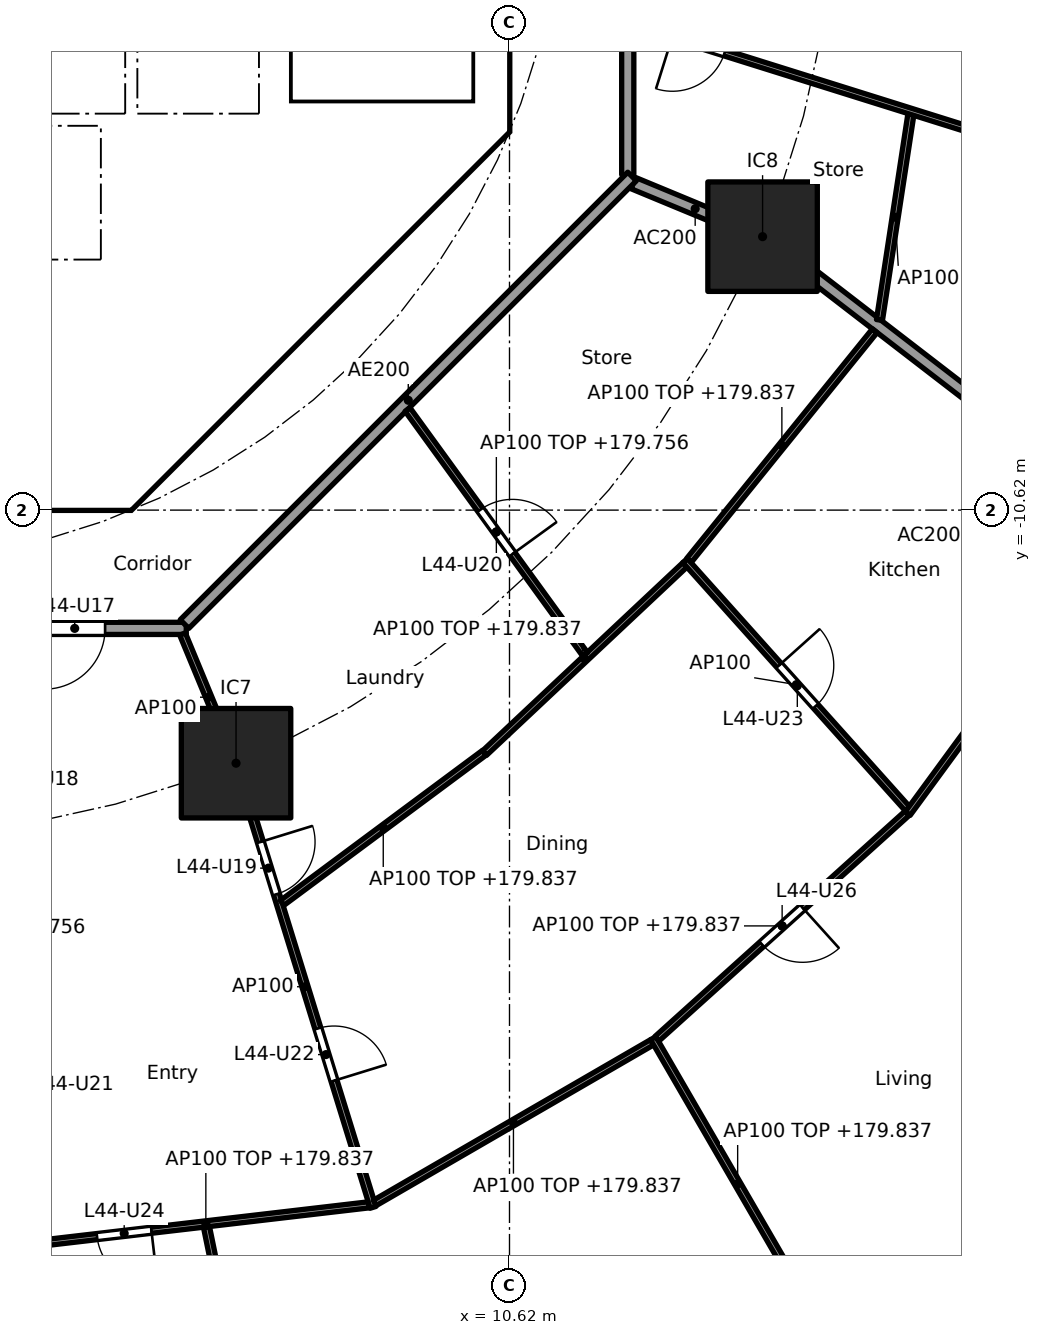
"""IFC4 building model, lengths in metres.
Left out: names, types, materials, properties, quantities, classifications, styles, units other than length and angle.
Written with IfcOpenShell. Run it as: python <this file> out.ifc"""

import sys

from ifc_helpers import new_model, si_unit, direction, frame, frame_2d, origin, origin_2d, place, context, subcontext, project, spatial, polyline, rectangle, outline, extrude, element, fill, save


model = new_model("IFC4")
c1 = context("Model", 3, precision=1e-05, world=origin(), true_north=direction((0.0, 1.0)))
c2 = subcontext(c1, "Body", "Model", "MODEL_VIEW")
j1 = project(units=[si_unit("LENGTHUNIT", "METRE"), si_unit("PLANEANGLEUNIT", "RADIAN")], contexts=[c1])
p1 = place(None, origin())
s1 = spatial("IfcSite", under=j1, at=p1, CompositionType="ELEMENT")
p2 = place(p1, origin())
s2 = spatial("IfcBuilding", under=s1, at=p2, CompositionType="ELEMENT")
p3 = place(p2, frame((0.0, 0.0, 177.0)))
s3 = spatial("IfcBuildingStorey", under=s2, at=p3, CompositionType="ELEMENT", Elevation=177.0)
for number, where, z_axis, x_axis in (
    (1, (6.123, -14.782, 0.0), (0.0, 0.0, 1.0), (1.0, 0.0, 0.0)),
    (2, (14.782, -6.123, 0.0), (0.0, 0.0, 1.0), (1.0, 0.0, 0.0)),
):
    element("IfcColumn", number, at=place(p3, frame(where, z_axis=z_axis, x_axis=x_axis)), inside=s3, PredefinedType="COLUMN", context=c2, shape_type="SweptSolid", body=[
        extrude(rectangle(XDim=1.8, YDim=1.8, at=origin_2d()), origin(), (0.0, 0.0, 1.0), 3.7),
    ])
p4 = place(p3, frame((18.972, -22.809, 0.0), z_axis=(0.0, 0.0, 1.0), x_axis=(-0.796055733703, -0.60522332146, 0.0)))
e3 = element("IfcWall", 3, at=p4, inside=s3, PredefinedType="SOLIDWALL", context=c2, shape_type="SweptSolid", body=[
    extrude(rectangle(XDim=2.917, YDim=0.25, at=frame_2d((1.458, 0.0))), origin(), (0.0, 0.0, 1.0), 3.44),
])
p5 = place(p4, frame((0.408, 0.0, 0.0)))
e4 = element("IfcOpeningElement", 4, at=p5, cuts=e3, PredefinedType="OPENING", context=c2, shape_type="SweptSolid", body=[
    extrude(rectangle(XDim=2.1, YDim=2.4, at=frame_2d((1.05, 1.2))), frame((0.0, 0.135, 0.0), z_axis=(0.0, -1.0, 0.0), x_axis=(1.0, 0.0, 0.0)), (0.0, 0.0, 1.0), 0.27),
])
p6 = place(p3, frame((4.613, -9.988, 0.0), z_axis=(0.0, 0.0, 1.0), x_axis=(0.707106781187, 0.707106781187, 0.0)))
e5 = element("IfcWall", 5, at=p6, inside=s3, PredefinedType="SHEAR", context=c2, shape_type="SweptSolid", body=[
    extrude(rectangle(XDim=7.602, YDim=0.6, at=frame_2d((3.801, 0.0))), origin(), (0.0, 0.0, 1.0), 3.44),
])
p7 = place(p6, frame((3.201, 0.0, 0.0)))
e6 = element("IfcOpeningElement", 6, at=p7, cuts=e5, PredefinedType="OPENING", context=c2, shape_type="SweptSolid", body=[
    extrude(rectangle(XDim=1.2, YDim=2.1, at=frame_2d((0.6, 1.05))), frame((0.0, 0.31, 0.0), z_axis=(0.0, -1.0, 0.0), x_axis=(1.0, 0.0, 0.0)), (0.0, 0.0, 1.0), 0.62),
])
p8 = place(p3, frame((4.0, -10.025, 0.0), z_axis=(0.0, 0.0, 1.0), x_axis=(0.0, 1.0, 0.0)))
e7 = element("IfcWall", 7, at=p8, inside=s3, PredefinedType="SOLIDWALL", context=c2, shape_type="SweptSolid", body=[
    extrude(rectangle(XDim=3.0, YDim=0.2, at=frame_2d((1.5, 0.0))), origin(), (0.0, 0.0, 1.0), 3.44),
])
p9 = place(p8, frame((0.975, 0.0, 0.0)))
e8 = element("IfcOpeningElement", 8, at=p9, cuts=e7, PredefinedType="OPENING", context=c2, shape_type="SweptSolid", body=[
    extrude(rectangle(XDim=1.1, YDim=2.1, at=frame_2d((0.55, 1.05))), frame((0.0, 0.11, 0.0), z_axis=(0.0, -1.0, 0.0), x_axis=(1.0, 0.0, 0.0)), (0.0, 0.0, 1.0), 0.22),
])
p10 = place(p3, frame((4.0, -6.5, 0.0), z_axis=(0.0, 0.0, 1.0), x_axis=(0.0, 1.0, 0.0)))
e9 = element("IfcWall", 9, at=p10, inside=s3, PredefinedType="SOLIDWALL", context=c2, shape_type="SweptSolid", body=[
    extrude(rectangle(XDim=2.2, YDim=0.2, at=frame_2d((1.1, 0.0))), origin(), (0.0, 0.0, 1.0), 3.44),
])
p11 = place(p10, frame((0.55, 0.0, 0.0)))
e10 = element("IfcOpeningElement", 10, at=p11, cuts=e9, PredefinedType="OPENING", context=c2, shape_type="SweptSolid", body=[
    extrude(rectangle(XDim=1.1, YDim=2.1, at=frame_2d((0.55, 1.05))), frame((0.0, 0.11, 0.0), z_axis=(0.0, -1.0, 0.0), x_axis=(1.0, 0.0, 0.0)), (0.0, 0.0, 1.0), 0.22),
])
p12 = place(p3, origin())
e11 = element("IfcWall", 11, at=p12, inside=s3, PredefinedType="SHEAR", context=c2, shape_type="SweptSolid", body=[
    extrude(outline(polyline([(-4.152, -10.025), (4.152, -10.025), (4.401, -9.776), (4.825, -10.2), (4.401, -10.625), (-4.401, -10.625), (-4.825, -10.2), (-4.401, -9.776), (-4.152, -10.025)])), origin(), (0.0, 0.0, 1.0), 3.44),
])
p13 = place(p3, origin())
e12 = element("IfcWall", 12, at=p13, inside=s3, PredefinedType="SHEAR", context=c2, shape_type="SweptSolid", body=[
    extrude(outline(polyline([(9.776, -4.401), (10.025, -4.152), (10.025, -3.801), (10.025, 4.152), (9.776, 4.401), (10.2, 4.825), (10.625, 4.401), (10.625, -4.401), (10.2, -4.825), (9.776, -4.401)])), origin(), (0.0, 0.0, 1.0), 3.44),
])
p14 = place(p3, origin())
e13 = element("IfcWall", 13, at=p14, inside=s3, PredefinedType="SOLIDWALL", context=c2, shape_type="SweptSolid", body=[
    extrude(outline(polyline([(-6.7, -2.1), (-6.5, -2.1), (-6.5, -4.1), (-2.3, -4.1), (-2.3, -2.1), (-2.1, -2.1), (-2.1, -4.1), (-0.1, -4.1), (-0.1, -2.1), (0.1, -2.1), (0.1, -4.1), (2.1, -4.1), (2.1, -2.1), (2.3, -2.1), (2.3, -4.1), (4.3, -4.1), (4.3, -2.1), (4.5, -2.1), (4.5, -4.1), (6.5, -4.1), (6.5, -2.1), (6.7, -2.1), (6.7, -4.3), (-6.7, -4.3), (-6.7, -2.1)])), origin(), (0.0, 0.0, 1.0), 3.44),
])
p15 = place(p3, origin())
e14 = element("IfcWall", 14, at=p15, inside=s3, PredefinedType="SOLIDWALL", context=c2, shape_type="SweptSolid", body=[
    extrude(outline(polyline([(4.1, -7.025), (-4.1, -7.025), (-4.1, -6.5), (4.1, -6.5), (4.1, -7.025)])), origin(), (0.0, 0.0, 1.0), 3.44),
])
p16 = place(p3, origin())
e15 = element("IfcWall", 15, at=p16, inside=s3, PredefinedType="SOLIDWALL", context=c2, shape_type="SweptSolid", body=[
    extrude(outline(polyline([(7.025, -3.9), (6.7, -3.9), (6.7, 3.9), (7.025, 3.9), (7.025, -3.9)])), origin(), (0.0, 0.0, 1.0), 3.44),
])
p17 = place(p3, origin())
e16 = element("IfcWall", 16, at=p17, inside=s3, PredefinedType="SOLIDWALL", context=c2, shape_type="SweptSolid", body=[
    extrude(outline(polyline([(10.025, -4.1), (6.7, -4.1), (6.7, -3.9), (10.025, -3.9), (10.025, -4.1)])), origin(), (0.0, 0.0, 1.0), 3.44),
])
p18 = place(p3, frame((12.657, -5.243, 0.0), z_axis=(0.0, 0.0, 1.0), x_axis=(0.92383017907, -0.382802560388, 0.0)))
e17 = element("IfcWall", 17, at=p18, inside=s3, PredefinedType="PARTITIONING", context=c2, shape_type="SweptSolid", body=[
    extrude(rectangle(XDim=2.2, YDim=0.2, at=frame_2d((1.1, 0.0))), origin(), (0.0, 0.0, 1.0), 3.44),
])
p19 = place(p3, frame((14.822, -6.154, 0.0), z_axis=(0.0, 0.0, 1.0), x_axis=(0.792203056092, -0.610257583254, 0.0)))
e18 = element("IfcWall", 18, at=p19, inside=s3, PredefinedType="PARTITIONING", context=c2, shape_type="SweptSolid", body=[
    extrude(rectangle(XDim=12.533, YDim=0.2, at=frame_2d((6.266, 0.0))), origin(), (0.0, 0.0, 1.0), 2.837),
])
p20 = place(p3, frame((12.565, -5.104, 0.0), z_axis=(0.0, 0.0, 1.0), x_axis=(0.0, 1.0, 0.0)))
e19 = element("IfcWall", 19, at=p20, inside=s3, PredefinedType="PARTITIONING", context=c2, shape_type="SweptSolid", body=[
    extrude(rectangle(XDim=10.209, YDim=0.2, at=frame_2d((5.104, 0.0))), origin(), (0.0, 0.0, 1.0), 3.44),
])
p21 = place(p20, frame((3.303, 0.0, 0.0)))
e20 = element("IfcOpeningElement", 20, at=p21, cuts=e19, PredefinedType="OPENING", context=c2, shape_type="SweptSolid", body=[
    extrude(rectangle(XDim=1.0, YDim=2.1, at=frame_2d((0.5, 1.05))), frame((0.0, 0.11, 0.0), z_axis=(0.0, -1.0, 0.0), x_axis=(1.0, 0.0, 0.0)), (0.0, 0.0, 1.0), 0.22),
])
p22 = place(p3, frame((-5.104, -12.565, 0.0), z_axis=(0.0, 0.0, 1.0), x_axis=(1.0, 0.0, 0.0)))
e21 = element("IfcWall", 21, at=p22, inside=s3, PredefinedType="PARTITIONING", context=c2, shape_type="SweptSolid", body=[
    extrude(rectangle(XDim=10.409, YDim=0.2, at=frame_2d((5.205, 0.0))), origin(), (0.0, 0.0, 1.0), 3.44),
])
p23 = place(p22, frame((8.074, 0.0, 0.0)))
e22 = element("IfcOpeningElement", 22, at=p23, cuts=e21, PredefinedType="OPENING", context=c2, shape_type="SweptSolid", body=[
    extrude(rectangle(XDim=1.0, YDim=2.1, at=frame_2d((0.5, 1.05))), frame((0.0, 0.11, 0.0), z_axis=(0.0, -1.0, 0.0), x_axis=(1.0, 0.0, 0.0)), (0.0, 0.0, 1.0), 0.22),
])
p24 = place(p3, frame((5.275, -12.494, 0.0), z_axis=(0.0, 0.0, 1.0), x_axis=(0.707106781187, 0.707106781187, 0.0)))
e23 = element("IfcWall", 23, at=p24, inside=s3, PredefinedType="PARTITIONING", context=c2, shape_type="SweptSolid", body=[
    extrude(rectangle(XDim=10.409, YDim=0.2, at=frame_2d((5.205, 0.0))), origin(), (0.0, 0.0, 1.0), 3.44),
])
p25 = place(p3, frame((2.941, -22.671, 0.0), z_axis=(0.0, 0.0, 1.0), x_axis=(0.993245806382, 0.1160291692, 0.0)))
e24 = element("IfcWall", 24, at=p25, inside=s3, PredefinedType="PARTITIONING", context=c2, shape_type="SweptSolid", body=[
    extrude(rectangle(XDim=5.408, YDim=0.1, at=frame_2d((2.704, 0.0))), origin(), (0.0, 0.0, 1.0), 2.837),
])
p26 = place(p25, frame((0.902, 0.0, 0.0)))
e25 = element("IfcOpeningElement", 25, at=p26, cuts=e24, PredefinedType="OPENING", context=c2, shape_type="SweptSolid", body=[
    extrude(rectangle(XDim=0.9, YDim=2.1, at=frame_2d((0.45, 1.05))), frame((0.0, 0.06, 0.0), z_axis=(0.0, -1.0, 0.0), x_axis=(1.0, 0.0, 0.0)), (0.0, 0.0, 1.0), 0.12),
])
p27 = place(p3, frame((5.636, -22.407, 0.0), z_axis=(0.0, 0.0, 1.0), x_axis=(0.200860375092, -0.979619880218, 0.0)))
e26 = element("IfcWall", 26, at=p27, inside=s3, PredefinedType="PARTITIONING", context=c2, shape_type="SweptSolid", body=[
    extrude(rectangle(XDim=6.311, YDim=0.1, at=frame_2d((3.155, 0.0))), origin(), (0.0, 0.0, 1.0), 2.905),
])
p28 = place(p27, frame((2.705, 0.0, 0.0)))
e27 = element("IfcOpeningElement", 27, at=p28, cuts=e26, PredefinedType="OPENING", context=c2, shape_type="SweptSolid", body=[
    extrude(rectangle(XDim=0.9, YDim=2.1, at=frame_2d((0.45, 1.05))), frame((0.0, 0.06, 0.0), z_axis=(0.0, -1.0, 0.0), x_axis=(1.0, 0.0, 0.0)), (0.0, 0.0, 1.0), 0.12),
])
p29 = place(p3, frame((5.243, -12.657, 0.0), z_axis=(0.0, 0.0, 1.0), x_axis=(0.382719158442, -0.923864733477, 0.0)))
e28 = element("IfcWall", 28, at=p29, inside=s3, PredefinedType="PARTITIONING", context=c2, shape_type="SweptSolid", body=[
    extrude(rectangle(XDim=2.25, YDim=0.1, at=frame_2d((1.125, 0.0))), origin(), (0.0, 0.0, 1.0), 3.44),
])
p30 = place(p3, frame((6.138, -14.83, 0.0), z_axis=(0.0, 0.0, 1.0), x_axis=(0.294822274121, -0.955552105687, 0.0)))
e29 = element("IfcWall", 29, at=p30, inside=s3, PredefinedType="PARTITIONING", context=c2, shape_type="SweptSolid", body=[
    extrude(rectangle(XDim=7.594, YDim=0.1, at=frame_2d((3.797, 0.0))), origin(), (0.0, 0.0, 1.0), 3.44),
])
p31 = place(p30, frame((1.306, 0.0, 0.0)))
e30 = element("IfcOpeningElement", 30, at=p31, cuts=e29, PredefinedType="OPENING", context=c2, shape_type="SweptSolid", body=[
    extrude(rectangle(XDim=0.9, YDim=2.1, at=frame_2d((0.45, 1.05))), frame((0.0, 0.06, 0.0), z_axis=(0.0, -1.0, 0.0), x_axis=(1.0, 0.0, 0.0)), (0.0, 0.0, 1.0), 0.12),
])
p32 = place(p30, frame((4.515, 0.0, 0.0)))
e31 = element("IfcOpeningElement", 31, at=p32, cuts=e29, PredefinedType="OPENING", context=c2, shape_type="SweptSolid", body=[
    extrude(rectangle(XDim=0.9, YDim=2.1, at=frame_2d((0.45, 1.05))), frame((0.0, 0.06, 0.0), z_axis=(0.0, -1.0, 0.0), x_axis=(1.0, 0.0, 0.0)), (0.0, 0.0, 1.0), 0.12),
])
p33 = place(p3, frame((6.881, -17.08, 0.0), z_axis=(0.0, 0.0, 1.0), x_axis=(0.802784956441, 0.596268659005, 0.0)))
e32 = element("IfcWall", 32, at=p33, inside=s3, PredefinedType="PARTITIONING", context=c2, shape_type="SweptSolid", body=[
    extrude(rectangle(XDim=4.142, YDim=0.1, at=frame_2d((2.071, 0.0))), origin(), (0.0, 0.0, 1.0), 2.837),
])
p34 = place(p3, frame((8.405, -22.013, 0.0), z_axis=(0.0, 0.0, 1.0), x_axis=(0.865277177388, 0.501293732547, 0.0)))
e33 = element("IfcWall", 33, at=p34, inside=s3, PredefinedType="PARTITIONING", context=c2, shape_type="SweptSolid", body=[
    extrude(rectangle(XDim=5.27, YDim=0.1, at=frame_2d((2.635, 0.0))), origin(), (0.0, 0.0, 1.0), 2.837),
])
p35 = place(p3, frame((10.21, -14.614, 0.0), z_axis=(0.0, 0.0, 1.0), x_axis=(0.728883199496, 0.684638066055, 0.0)))
e34 = element("IfcWall", 34, at=p35, inside=s3, PredefinedType="PARTITIONING", context=c2, shape_type="SweptSolid", body=[
    extrude(rectangle(XDim=4.519, YDim=0.1, at=frame_2d((2.26, 0.0))), origin(), (0.0, 0.0, 1.0), 2.837),
])
p36 = place(p3, frame((12.983, -19.303, 0.0), z_axis=(0.0, 0.0, 1.0), x_axis=(0.501315846071, -0.865264365659, 0.0)))
e35 = element("IfcWall", 35, at=p36, inside=s3, PredefinedType="PARTITIONING", context=c2, shape_type="SweptSolid", body=[
    extrude(rectangle(XDim=5.542, YDim=0.1, at=frame_2d((2.771, 0.0))), origin(), (0.0, 0.0, 1.0), 2.837),
])
p37 = place(p3, frame((13.045, -19.313, 0.0), z_axis=(0.0, 0.0, 1.0), x_axis=(0.742790086539, 0.66952437397, 0.0)))
e36 = element("IfcWall", 36, at=p37, inside=s3, PredefinedType="PARTITIONING", context=c2, shape_type="SweptSolid", body=[
    extrude(rectangle(XDim=5.542, YDim=0.1, at=frame_2d((2.771, 0.0))), origin(), (0.0, 0.0, 1.0), 2.837),
])
p38 = place(p37, frame((2.321, 0.0, 0.0)))
e37 = element("IfcOpeningElement", 37, at=p38, cuts=e36, PredefinedType="OPENING", context=c2, shape_type="SweptSolid", body=[
    extrude(rectangle(XDim=0.9, YDim=2.1, at=frame_2d((0.45, 1.05))), frame((0.0, 0.06, 0.0), z_axis=(0.0, -1.0, 0.0), x_axis=(1.0, 0.0, 0.0)), (0.0, 0.0, 1.0), 0.12),
])
p39 = place(p3, frame((8.943, -8.966, 0.0), z_axis=(0.0, 0.0, 1.0), x_axis=(0.587187896734, -0.809450661825, 0.0)))
e38 = element("IfcWall", 38, at=p39, inside=s3, PredefinedType="PARTITIONING", context=c2, shape_type="SweptSolid", body=[
    extrude(rectangle(XDim=4.975, YDim=0.1, at=frame_2d((2.487, 0.0))), origin(), (0.0, 0.0, 1.0), 2.756),
])
p40 = place(p39, frame((2.037, 0.0, 0.0)))
e39 = element("IfcOpeningElement", 39, at=p40, cuts=e38, PredefinedType="OPENING", context=c2, shape_type="SweptSolid", body=[
    extrude(rectangle(XDim=0.9, YDim=2.1, at=frame_2d((0.45, 1.05))), frame((0.0, 0.06, 0.0), z_axis=(0.0, -1.0, 0.0), x_axis=(1.0, 0.0, 0.0)), (0.0, 0.0, 1.0), 0.12),
])
p41 = place(p3, frame((13.507, -11.449, 0.0), z_axis=(0.0, 0.0, 1.0), x_axis=(0.667299792168, -0.744789223453, 0.0)))
e40 = element("IfcWall", 40, at=p41, inside=s3, PredefinedType="PARTITIONING", context=c2, shape_type="SweptSolid", body=[
    extrude(rectangle(XDim=5.482, YDim=0.1, at=frame_2d((2.741, 0.0))), origin(), (0.0, 0.0, 1.0), 3.44),
])
p42 = place(p41, frame((2.316, 0.0, 0.0)))
e41 = element("IfcOpeningElement", 41, at=p42, cuts=e40, PredefinedType="OPENING", context=c2, shape_type="SweptSolid", body=[
    extrude(rectangle(XDim=0.9, YDim=2.1, at=frame_2d((0.45, 1.05))), frame((0.0, 0.06, 0.0), z_axis=(0.0, -1.0, 0.0), x_axis=(1.0, 0.0, 0.0)), (0.0, 0.0, 1.0), 0.12),
])
p43 = place(p3, frame((13.572, -11.447, 0.0), z_axis=(0.0, 0.0, 1.0), x_axis=(0.628738316533, 0.777616955399, 0.0)))
e42 = element("IfcWall", 42, at=p43, inside=s3, PredefinedType="PARTITIONING", context=c2, shape_type="SweptSolid", body=[
    extrude(rectangle(XDim=4.857, YDim=0.1, at=frame_2d((2.429, 0.0))), origin(), (0.0, 0.0, 1.0), 2.837),
])
p44 = place(p3, frame((17.169, -15.609, 0.0), z_axis=(0.0, 0.0, 1.0), x_axis=(0.591122127251, 0.806582066918, 0.0)))
e43 = element("IfcWall", 43, at=p44, inside=s3, PredefinedType="PARTITIONING", context=c2, shape_type="SweptSolid", body=[
    extrude(rectangle(XDim=5.96, YDim=0.1, at=frame_2d((2.98, 0.0))), origin(), (0.0, 0.0, 1.0), 2.837),
])
p45 = place(p3, frame((16.704, -7.493, 0.0), z_axis=(0.0, 0.0, 1.0), x_axis=(0.1510806336, 0.988521442434, 0.0)))
e44 = element("IfcWall", 44, at=p45, inside=s3, PredefinedType="PARTITIONING", context=c2, shape_type="SweptSolid", body=[
    extrude(rectangle(XDim=3.419, YDim=0.1, at=frame_2d((1.71, 0.0))), origin(), (0.0, 0.0, 1.0), 2.837),
])
p46 = place(p3, frame((12.66, -2.632, 0.0), z_axis=(0.0, 0.0, 1.0), x_axis=(0.954248738607, -0.299013954302, 0.0)))
e45 = element("IfcWall", 45, at=p46, inside=s3, PredefinedType="PARTITIONING", context=c2, shape_type="SweptSolid", body=[
    extrude(rectangle(XDim=15.142, YDim=0.1, at=frame_2d((7.571, 0.0))), origin(), (0.0, 0.0, 1.0), 2.756),
])
p47 = place(p46, frame((0.669, 0.0, 0.0)))
e46 = element("IfcOpeningElement", 46, at=p47, cuts=e45, PredefinedType="OPENING", context=c2, shape_type="SweptSolid", body=[
    extrude(rectangle(XDim=0.9, YDim=2.1, at=frame_2d((0.45, 1.05))), frame((0.0, 0.06, 0.0), z_axis=(0.0, -1.0, 0.0), x_axis=(1.0, 0.0, 0.0)), (0.0, 0.0, 1.0), 0.12),
])
p48 = place(p46, frame((6.944, 0.0, 0.0)))
e47 = element("IfcOpeningElement", 47, at=p48, cuts=e45, PredefinedType="OPENING", context=c2, shape_type="SweptSolid", body=[
    extrude(rectangle(XDim=0.9, YDim=2.1, at=frame_2d((0.45, 1.05))), frame((0.0, 0.06, 0.0), z_axis=(0.0, -1.0, 0.0), x_axis=(1.0, 0.0, 0.0)), (0.0, 0.0, 1.0), 0.12),
])
p49 = place(p11, origin())
e48 = element("IfcDoor", 48, at=p49, inside=s3, OperationType="DOUBLE_DOOR_SLIDING", PredefinedType="DOOR", context=c2, shape_type="SweptSolid", body=[
    extrude(rectangle(XDim=1.1, YDim=2.1, at=frame_2d((0.55, 1.05))), frame((0.0, 0.025, 0.0), z_axis=(0.0, -1.0, 0.0), x_axis=(1.0, 0.0, 0.0)), (0.0, 0.0, 1.0), 0.05),
])
fill(e10, e48)
p50 = place(p9, origin())
e49 = element("IfcDoor", 49, at=p50, inside=s3, OperationType="SINGLE_SWING_LEFT", PredefinedType="DOOR", context=c2, shape_type="SweptSolid", body=[
    extrude(rectangle(XDim=1.1, YDim=2.1, at=frame_2d((0.55, 1.05))), frame((0.0, 0.025, 0.0), z_axis=(0.0, -1.0, 0.0), x_axis=(1.0, 0.0, 0.0)), (0.0, 0.0, 1.0), 0.05),
])
fill(e8, e49)
p51 = place(p7, origin())
e50 = element("IfcDoor", 50, at=p51, inside=s3, OperationType="SINGLE_SWING_LEFT", PredefinedType="DOOR", context=c2, shape_type="SweptSolid", body=[
    extrude(rectangle(XDim=1.2, YDim=2.1, at=frame_2d((0.6, 1.05))), frame((0.0, 0.025, 0.0), z_axis=(0.0, -1.0, 0.0), x_axis=(1.0, 0.0, 0.0)), (0.0, 0.0, 1.0), 0.05),
])
fill(e6, e50)
p52 = place(p23, frame((1.0, 0.0, 0.0), x_axis=(-1.0, 0.0, 0.0)))
e51 = element("IfcDoor", 51, at=p52, inside=s3, OperationType="SINGLE_SWING_RIGHT", PredefinedType="DOOR", context=c2, shape_type="SweptSolid", body=[
    extrude(rectangle(XDim=1.0, YDim=2.1, at=frame_2d((0.5, 1.05))), frame((0.0, 0.025, 0.0), z_axis=(0.0, -1.0, 0.0), x_axis=(1.0, 0.0, 0.0)), (0.0, 0.0, 1.0), 0.05),
])
fill(e22, e51)
p53 = place(p31, origin())
e52 = element("IfcDoor", 52, at=p53, inside=s3, OperationType="SINGLE_SWING_LEFT", PredefinedType="DOOR", context=c2, shape_type="SweptSolid", body=[
    extrude(rectangle(XDim=0.9, YDim=2.1, at=frame_2d((0.45, 1.05))), frame((0.0, 0.025, 0.0), z_axis=(0.0, -1.0, 0.0), x_axis=(1.0, 0.0, 0.0)), (0.0, 0.0, 1.0), 0.05),
])
fill(e30, e52)
p54 = place(p40, origin())
e53 = element("IfcDoor", 53, at=p54, inside=s3, OperationType="SINGLE_SWING_RIGHT", PredefinedType="DOOR", context=c2, shape_type="SweptSolid", body=[
    extrude(rectangle(XDim=0.9, YDim=2.1, at=frame_2d((0.45, 1.05))), frame((0.0, 0.025, 0.0), z_axis=(0.0, -1.0, 0.0), x_axis=(1.0, 0.0, 0.0)), (0.0, 0.0, 1.0), 0.05),
])
fill(e39, e53)
p55 = place(p32, origin())
e54 = element("IfcDoor", 54, at=p55, inside=s3, OperationType="SINGLE_SWING_RIGHT", PredefinedType="DOOR", context=c2, shape_type="SweptSolid", body=[
    extrude(rectangle(XDim=0.9, YDim=2.1, at=frame_2d((0.45, 1.05))), frame((0.0, 0.025, 0.0), z_axis=(0.0, -1.0, 0.0), x_axis=(1.0, 0.0, 0.0)), (0.0, 0.0, 1.0), 0.05),
])
fill(e31, e54)
p56 = place(p42, origin())
e55 = element("IfcDoor", 55, at=p56, inside=s3, OperationType="SINGLE_SWING_LEFT", PredefinedType="DOOR", context=c2, shape_type="SweptSolid", body=[
    extrude(rectangle(XDim=0.9, YDim=2.1, at=frame_2d((0.45, 1.05))), frame((0.0, 0.025, 0.0), z_axis=(0.0, -1.0, 0.0), x_axis=(1.0, 0.0, 0.0)), (0.0, 0.0, 1.0), 0.05),
])
fill(e41, e55)
p57 = place(p26, frame((0.9, 0.0, 0.0), x_axis=(-1.0, 0.0, 0.0)))
e56 = element("IfcDoor", 56, at=p57, inside=s3, OperationType="SINGLE_SWING_LEFT", PredefinedType="DOOR", context=c2, shape_type="SweptSolid", body=[
    extrude(rectangle(XDim=0.9, YDim=2.1, at=frame_2d((0.45, 1.05))), frame((0.0, 0.025, 0.0), z_axis=(0.0, -1.0, 0.0), x_axis=(1.0, 0.0, 0.0)), (0.0, 0.0, 1.0), 0.05),
])
fill(e25, e56)
p58 = place(p38, frame((0.9, 0.0, 0.0), x_axis=(-1.0, 0.0, 0.0)))
e57 = element("IfcDoor", 57, at=p58, inside=s3, OperationType="SINGLE_SWING_LEFT", PredefinedType="DOOR", context=c2, shape_type="SweptSolid", body=[
    extrude(rectangle(XDim=0.9, YDim=2.1, at=frame_2d((0.45, 1.05))), frame((0.0, 0.025, 0.0), z_axis=(0.0, -1.0, 0.0), x_axis=(1.0, 0.0, 0.0)), (0.0, 0.0, 1.0), 0.05),
])
fill(e37, e57)
p59 = place(p47, frame((0.9, 0.0, 0.0), x_axis=(-1.0, 0.0, 0.0)))
e58 = element("IfcDoor", 58, at=p59, inside=s3, OperationType="SINGLE_SWING_RIGHT", PredefinedType="DOOR", context=c2, shape_type="SweptSolid", body=[
    extrude(rectangle(XDim=0.9, YDim=2.1, at=frame_2d((0.45, 1.05))), frame((0.0, 0.025, 0.0), z_axis=(0.0, -1.0, 0.0), x_axis=(1.0, 0.0, 0.0)), (0.0, 0.0, 1.0), 0.05),
])
fill(e46, e58)
save(model, sys.argv[1])
